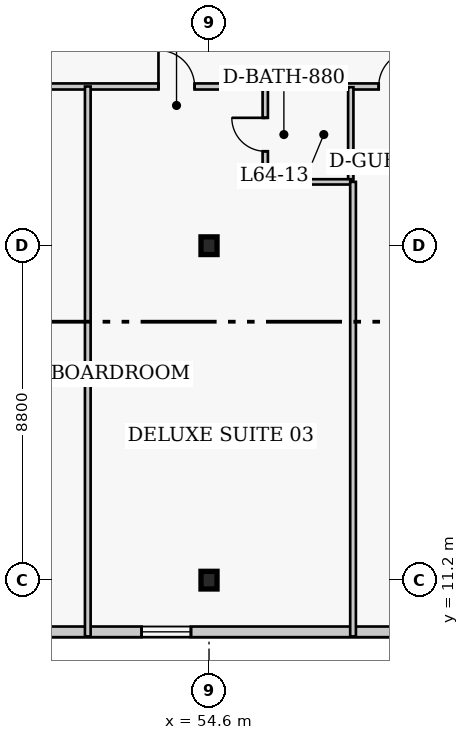
"""IFC4 building model, lengths in metres.
Left out: names, types, materials, properties, quantities, classifications, styles, units other than length and angle.
Written with IfcOpenShell. Run it as: python <this file> out.ifc"""

import sys

from ifc_helpers import new_model, si_unit, direction, frame, frame_2d, origin, origin_2d, place, context, subcontext, project, spatial, rectangle, i_section, extrude, element, fill, save


model = new_model("IFC4")
c1 = context("Model", 3, precision=1e-05, world=origin(), true_north=direction((0.0, 1.0)))
c2 = subcontext(c1, "Body", "Model", "MODEL_VIEW")
j1 = project(units=[si_unit("LENGTHUNIT", "METRE"), si_unit("PLANEANGLEUNIT", "RADIAN")], contexts=[c1])
p1 = place(None, origin())
s1 = spatial("IfcSite", under=j1, at=p1, CompositionType="ELEMENT")
p2 = place(p1, origin())
s2 = spatial("IfcBuilding", under=s1, at=p2, CompositionType="ELEMENT")
p3 = place(p2, frame((0.0, 0.0, 257.4)))
s3 = spatial("IfcBuildingStorey", under=s2, at=p3, CompositionType="ELEMENT", Elevation=257.4)
for number, where, z_axis, x_axis in (
    (1, (54.6, 11.2, 0.0), (0.0, 0.0, 1.0), (1.0, 0.0, 0.0)),
    (2, (54.6, 20.0, 0.0), (0.0, 0.0, 1.0), (1.0, 0.0, 0.0)),
):
    element("IfcColumn", number, at=place(p3, frame(where, z_axis=z_axis, x_axis=x_axis)), inside=s3, PredefinedType="COLUMN", context=c2, shape_type="SweptSolid", body=[
        extrude(i_section(OverallWidth=0.422, OverallDepth=0.465, WebThickness=0.045, FlangeThickness=0.073, FilletRadius=0.017, at=origin_2d()), origin(), (0.0, 0.0, 1.0), 4.0),
    ])
p4 = place(p3, frame((41.71, 9.84, 0.0), z_axis=(0.0, 0.0, 1.0), x_axis=(1.0, 0.0, 0.0)))
e3 = element("IfcWall", 3, at=p4, inside=s3, PredefinedType="SOLIDWALL", context=c2, shape_type="SweptSolid", body=[
    extrude(rectangle(XDim=24.83, YDim=0.28, at=frame_2d((12.415, 0.0))), origin(), (0.0, 0.0, 1.0), 3.76),
])
p5 = place(p4, frame((3.488, 0.0, 0.85)))
e4 = element("IfcOpeningElement", 4, at=p5, cuts=e3, PredefinedType="OPENING", context=c2, shape_type="SweptSolid", body=[
    extrude(rectangle(XDim=1.3, YDim=1.7, at=frame_2d((0.65, 0.85))), frame((0.0, 0.15, 0.0), z_axis=(0.0, -1.0, 0.0), x_axis=(1.0, 0.0, 0.0)), (0.0, 0.0, 1.0), 0.3),
])
p6 = place(p4, frame((11.115, 0.0, 0.85)))
e5 = element("IfcOpeningElement", 5, at=p6, cuts=e3, PredefinedType="OPENING", context=c2, shape_type="SweptSolid", body=[
    extrude(rectangle(XDim=1.3, YDim=1.7, at=frame_2d((0.65, 0.85))), frame((0.0, 0.15, 0.0), z_axis=(0.0, -1.0, 0.0), x_axis=(1.0, 0.0, 0.0)), (0.0, 0.0, 1.0), 0.3),
])
p7 = place(p4, frame((18.892, 0.0, 0.85)))
e6 = element("IfcOpeningElement", 6, at=p7, cuts=e3, PredefinedType="OPENING", context=c2, shape_type="SweptSolid", body=[
    extrude(rectangle(XDim=1.3, YDim=1.7, at=frame_2d((0.65, 0.85))), frame((0.0, 0.15, 0.0), z_axis=(0.0, -1.0, 0.0), x_axis=(1.0, 0.0, 0.0)), (0.0, 0.0, 1.0), 0.3),
])
p8 = place(p3, frame((35.8, 24.19, 0.0), z_axis=(0.0, 0.0, 1.0), x_axis=(1.0, 0.0, 0.0)))
e7 = element("IfcWall", 7, at=p8, inside=s3, PredefinedType="PARTITIONING", context=c2, shape_type="SweptSolid", body=[
    extrude(rectangle(XDim=24.81, YDim=0.16, at=frame_2d((12.405, 0.0))), origin(), (0.0, 0.0, 1.0), 3.76),
])
p9 = place(p8, frame((2.115, 0.0, 0.0)))
e8 = element("IfcOpeningElement", 8, at=p9, cuts=e7, PredefinedType="OPENING", context=c2, shape_type="SweptSolid", body=[
    extrude(rectangle(XDim=0.95, YDim=2.1, at=frame_2d((0.475, 1.05))), frame((0.0, 0.09, 0.0), z_axis=(0.0, -1.0, 0.0), x_axis=(1.0, 0.0, 0.0)), (0.0, 0.0, 1.0), 0.18),
])
p10 = place(p8, frame((11.345, 0.0, 0.0)))
e9 = element("IfcOpeningElement", 9, at=p10, cuts=e7, PredefinedType="OPENING", context=c2, shape_type="SweptSolid", body=[
    extrude(rectangle(XDim=1.0, YDim=2.15, at=frame_2d((0.5, 1.075))), frame((0.0, 0.09, 0.0), z_axis=(0.0, -1.0, 0.0), x_axis=(1.0, 0.0, 0.0)), (0.0, 0.0, 1.0), 0.18),
])
p11 = place(p8, frame((17.47, 0.0, 0.0)))
e10 = element("IfcOpeningElement", 10, at=p11, cuts=e7, PredefinedType="OPENING", context=c2, shape_type="SweptSolid", body=[
    extrude(rectangle(XDim=0.95, YDim=2.1, at=frame_2d((0.475, 1.05))), frame((0.0, 0.09, 0.0), z_axis=(0.0, -1.0, 0.0), x_axis=(1.0, 0.0, 0.0)), (0.0, 0.0, 1.0), 0.18),
])
p12 = place(p8, frame((23.265, 0.0, 0.0)))
e11 = element("IfcOpeningElement", 11, at=p12, cuts=e7, PredefinedType="OPENING", context=c2, shape_type="SweptSolid", body=[
    extrude(rectangle(XDim=0.95, YDim=2.1, at=frame_2d((0.475, 1.05))), frame((0.0, 0.09, 0.0), z_axis=(0.0, -1.0, 0.0), x_axis=(1.0, 0.0, 0.0)), (0.0, 0.0, 1.0), 0.18),
])
p13 = place(p3, frame((51.41, 9.72, 0.0), z_axis=(0.0, 0.0, 1.0), x_axis=(0.0, 1.0, 0.0)))
e12 = element("IfcWall", 12, at=p13, inside=s3, PredefinedType="PARTITIONING", context=c2, shape_type="SweptSolid", body=[
    extrude(rectangle(XDim=14.47, YDim=0.15, at=frame_2d((7.235, 0.0))), origin(), (0.0, 0.0, 1.0), 3.76),
])
p14 = place(p3, frame((56.08, 21.68, 0.0), z_axis=(0.0, 0.0, 1.0), x_axis=(0.0, 1.0, 0.0)))
e13 = element("IfcWall", 13, at=p14, inside=s3, PredefinedType="PLUMBINGWALL", context=c2, shape_type="SweptSolid", body=[
    extrude(rectangle(XDim=2.49, YDim=0.14, at=frame_2d((1.245, 0.0))), origin(), (0.0, 0.0, 1.0), 3.76),
])
p15 = place(p14, frame((0.805, 0.0, 0.0)))
e14 = element("IfcOpeningElement", 14, at=p15, cuts=e13, PredefinedType="OPENING", context=c2, shape_type="SweptSolid", body=[
    extrude(rectangle(XDim=0.88, YDim=2.05, at=frame_2d((0.44, 1.025))), frame((0.0, 0.08, 0.0), z_axis=(0.0, -1.0, 0.0), x_axis=(1.0, 0.0, 0.0)), (0.0, 0.0, 1.0), 0.16),
])
p16 = place(p3, frame((58.33, 21.68, 0.0), z_axis=(0.0, 0.0, 1.0), x_axis=(0.0, 1.0, 0.0)))
e15 = element("IfcWall", 15, at=p16, inside=s3, PredefinedType="PLUMBINGWALL", context=c2, shape_type="SweptSolid", body=[
    extrude(rectangle(XDim=2.49, YDim=0.14, at=frame_2d((1.245, 0.0))), origin(), (0.0, 0.0, 1.0), 3.76),
])
p17 = place(p3, frame((56.08, 21.68, 0.0), z_axis=(0.0, 0.0, 1.0), x_axis=(1.0, 0.0, 0.0)))
e16 = element("IfcWall", 16, at=p17, inside=s3, PredefinedType="PLUMBINGWALL", context=c2, shape_type="SweptSolid", body=[
    extrude(rectangle(XDim=2.25, YDim=0.14, at=frame_2d((1.125, 0.0))), origin(), (0.0, 0.0, 1.0), 3.76),
])
p18 = place(p3, frame((58.39, 9.72, 0.0), z_axis=(0.0, 0.0, 1.0), x_axis=(0.0, 1.0, 0.0)))
e17 = element("IfcWall", 17, at=p18, inside=s3, PredefinedType="PARTITIONING", context=c2, shape_type="SweptSolid", body=[
    extrude(rectangle(XDim=11.96, YDim=0.15, at=frame_2d((5.98, 0.0))), origin(), (0.0, 0.0, 1.0), 3.356),
])
p19 = place(p6, origin())
e18 = element("IfcWindow", 18, at=p19, inside=s3, PartitioningType="SINGLE_PANEL", PredefinedType="WINDOW", context=c2, shape_type="SweptSolid", body=[
    extrude(rectangle(XDim=1.3, YDim=1.7, at=frame_2d((0.65, 0.85))), frame((0.0, 0.03, 0.0), z_axis=(0.0, -1.0, 0.0), x_axis=(1.0, 0.0, 0.0)), (0.0, 0.0, 1.0), 0.06),
])
fill(e5, e18)
p20 = place(p15, origin())
e19 = element("IfcDoor", 19, at=p20, inside=s3, OperationType="SINGLE_SWING_RIGHT", PredefinedType="DOOR", context=c2, shape_type="SweptSolid", body=[
    extrude(rectangle(XDim=0.88, YDim=2.05, at=frame_2d((0.44, 1.025))), frame((0.0, 0.025, 0.0), z_axis=(0.0, -1.0, 0.0), x_axis=(1.0, 0.0, 0.0)), (0.0, 0.0, 1.0), 0.05),
])
fill(e14, e19)
p21 = place(p11, origin())
e20 = element("IfcDoor", 20, at=p21, inside=s3, OperationType="SINGLE_SWING_LEFT", PredefinedType="DOOR", context=c2, shape_type="SweptSolid", body=[
    extrude(rectangle(XDim=0.95, YDim=2.1, at=frame_2d((0.475, 1.05))), frame((0.0, 0.025, 0.0), z_axis=(0.0, -1.0, 0.0), x_axis=(1.0, 0.0, 0.0)), (0.0, 0.0, 1.0), 0.05),
])
fill(e10, e20)
p22 = place(p12, origin())
e21 = element("IfcDoor", 21, at=p22, inside=s3, OperationType="SINGLE_SWING_RIGHT", PredefinedType="DOOR", context=c2, shape_type="SweptSolid", body=[
    extrude(rectangle(XDim=0.95, YDim=2.1, at=frame_2d((0.475, 1.05))), frame((0.0, 0.025, 0.0), z_axis=(0.0, -1.0, 0.0), x_axis=(1.0, 0.0, 0.0)), (0.0, 0.0, 1.0), 0.05),
])
fill(e11, e21)
save(model, sys.argv[1])
